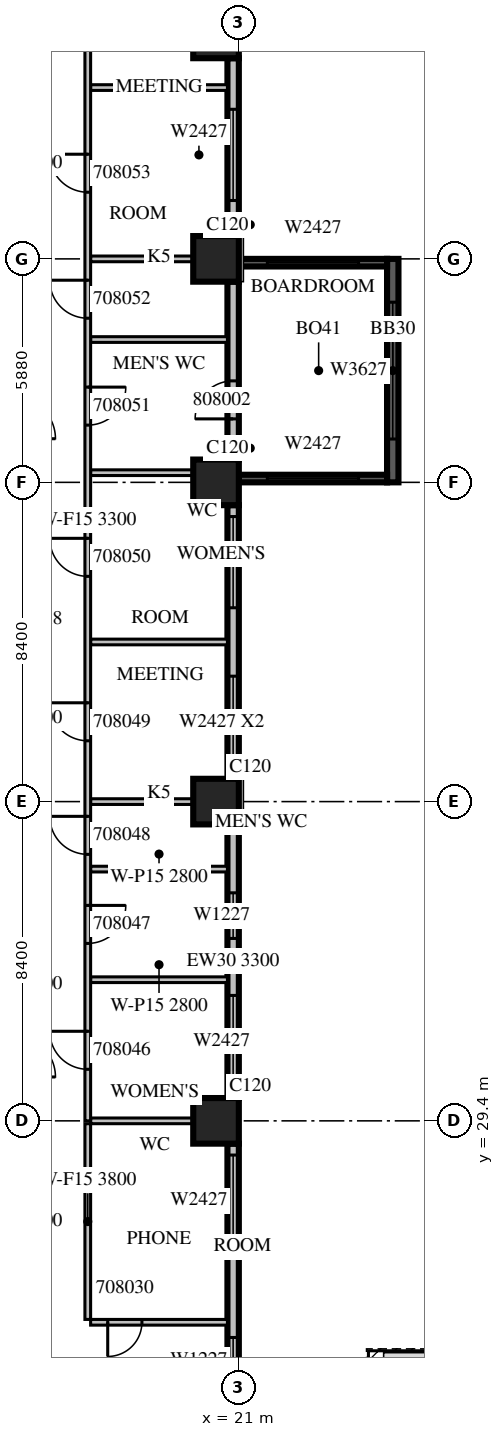
"""IFC4 building model, lengths in metres.
Left out: names, types, materials, properties, quantities, classifications, styles, units other than length and angle.
Written with IfcOpenShell. Run it as: python <this file> out.ifc"""

import sys

from ifc_helpers import new_model, si_unit, direction, frame, frame_2d, origin, origin_2d, place, context, subcontext, project, spatial, rectangle, extrude, source, transform, mapped, element, fill, save


model = new_model("IFC4")
c1 = context("Model", 3, precision=1e-05, world=origin(), true_north=direction((0.0, 1.0)))
c2 = subcontext(c1, "Body", "Model", "MODEL_VIEW")
j1 = project(units=[si_unit("LENGTHUNIT", "METRE"), si_unit("PLANEANGLEUNIT", "RADIAN")], contexts=[c1])
p1 = place(None, origin())
s1 = spatial("IfcSite", under=j1, at=p1, CompositionType="ELEMENT")
p2 = place(p1, origin())
s2 = spatial("IfcBuilding", under=s1, at=p2, CompositionType="ELEMENT")
p3 = place(p2, frame((0.0, 0.0, 44.7)))
s3 = spatial("IfcBuildingStorey", under=s2, at=p3, CompositionType="ELEMENT", Elevation=44.7)
m1 = source(origin(), c2, "Body", "SweptSolid", [
    extrude(rectangle(XDim=1.2, YDim=1.2, at=origin_2d()), origin(), (0.0, 0.0, 1.0), 4.2),
])
for number, where, z_axis, x_axis in (
    (1, (20.4, 29.4, 0.0), (0.0, 0.0, 1.0), (1.0, 0.0, 0.0)),
    (2, (20.4, 37.8, 0.0), (0.0, 0.0, 1.0), (1.0, 0.0, 0.0)),
    (3, (20.4, 46.2, 0.0), (0.0, 0.0, 1.0), (1.0, 0.0, 0.0)),
    (4, (20.4, 52.08, 0.0), (0.0, 0.0, 1.0), (1.0, 0.0, 0.0)),
    (5, (20.4, 57.96, 0.0), (0.0, 0.0, 1.0), (1.0, 0.0, 0.0)),
):
    element("IfcColumn", number, at=place(p3, frame(where, z_axis=z_axis, x_axis=x_axis)), inside=s3, PredefinedType="COLUMN", context=c2, shape_type="MappedRepresentation", body=[
        mapped(m1, transform((0.0, 0.0, 0.0), scale=1.0)),
    ])
p4 = place(p3, frame((20.85, 22.2, 0.0), z_axis=(0.0, 0.0, 1.0), x_axis=(0.0, 1.0, 0.0)))
e6 = element("IfcWall", 6, at=p4, inside=s3, PredefinedType="STANDARD", context=c2, shape_type="SweptSolid", body=[
    extrude(rectangle(XDim=6.6, YDim=0.3, at=frame_2d((3.3, 0.0))), origin(), (0.0, 0.0, 1.0), 3.8),
])
m2 = source(origin(), c2, "Body", "SweptSolid", [
    extrude(rectangle(XDim=1.2, YDim=2.7, at=frame_2d((0.6, 1.35))), frame((0.0, 0.16, 0.0), z_axis=(0.0, -1.0, 0.0), x_axis=(1.0, 0.0, 0.0)), (0.0, 0.0, 1.0), 0.32),
])
p5 = place(p4, frame((0.3, 0.0, 0.6)))
e7 = element("IfcOpeningElement", 7, at=p5, cuts=e6, PredefinedType="OPENING", context=c2, shape_type="MappedRepresentation", body=[
    mapped(m2, transform((0.0, 0.0, 0.0), scale=1.0)),
])
m3 = source(origin(), c2, "Body", "SweptSolid", [
    extrude(rectangle(XDim=2.4, YDim=2.7, at=frame_2d((1.2, 1.35))), frame((0.0, 0.16, 0.0), z_axis=(0.0, -1.0, 0.0), x_axis=(1.0, 0.0, 0.0)), (0.0, 0.0, 1.0), 0.32),
])
p6 = place(p4, frame((3.9, 0.0, 0.6)))
e8 = element("IfcOpeningElement", 8, at=p6, cuts=e6, PredefinedType="OPENING", context=c2, shape_type="MappedRepresentation", body=[
    mapped(m3, transform((0.0, 0.0, 0.0), scale=1.0)),
])
m4 = source(origin(), c2, "Body", "SweptSolid", [
    extrude(rectangle(XDim=7.2, YDim=0.3, at=frame_2d((3.6, 0.0))), origin(), (0.0, 0.0, 1.0), 3.3),
])
p7 = place(p3, frame((20.85, 30.0, 0.0), z_axis=(0.0, 0.0, 1.0), x_axis=(0.0, 1.0, 0.0)))
e9 = element("IfcWall", 9, at=p7, inside=s3, PredefinedType="STANDARD", context=c2, shape_type="MappedRepresentation", body=[
    mapped(m4, transform((0.0, 0.0, 0.0), scale=1.0)),
])
p8 = place(p7, frame((0.3, 0.0, 0.6)))
e10 = element("IfcOpeningElement", 10, at=p8, cuts=e9, PredefinedType="OPENING", context=c2, shape_type="MappedRepresentation", body=[
    mapped(m3, transform((0.0, 0.0, 0.0), scale=1.0)),
])
p9 = place(p7, frame((4.199, 0.0, 0.6)))
e11 = element("IfcOpeningElement", 11, at=p9, cuts=e9, PredefinedType="OPENING", context=c2, shape_type="MappedRepresentation", body=[
    mapped(m2, transform((0.0, 0.0, 0.0), scale=1.0)),
])
m5 = source(origin(), c2, "Body", "SweptSolid", [
    extrude(rectangle(XDim=7.2, YDim=0.3, at=frame_2d((3.6, 0.0))), origin(), (0.0, 0.0, 1.0), 3.8),
])
p10 = place(p3, frame((20.85, 38.4, 0.0), z_axis=(0.0, 0.0, 1.0), x_axis=(0.0, 1.0, 0.0)))
e12 = element("IfcWall", 12, at=p10, inside=s3, PredefinedType="STANDARD", context=c2, shape_type="MappedRepresentation", body=[
    mapped(m5, transform((0.0, 0.0, 0.0), scale=1.0)),
])
p11 = place(p10, frame((0.3, 0.0, 0.6)))
e13 = element("IfcOpeningElement", 13, at=p11, cuts=e12, PredefinedType="OPENING", context=c2, shape_type="MappedRepresentation", body=[
    mapped(m3, transform((0.0, 0.0, 0.0), scale=1.0)),
])
p12 = place(p10, frame((4.5, 0.0, 0.6)))
e14 = element("IfcOpeningElement", 14, at=p12, cuts=e12, PredefinedType="OPENING", context=c2, shape_type="MappedRepresentation", body=[
    mapped(m3, transform((0.0, 0.0, 0.0), scale=1.0)),
])
m6 = source(origin(), c2, "Body", "SweptSolid", [
    extrude(rectangle(XDim=4.68, YDim=0.3, at=frame_2d((2.34, 0.0))), origin(), (0.0, 0.0, 1.0), 3.8),
])
p13 = place(p3, frame((20.85, 46.8, 0.0), z_axis=(0.0, 0.0, 1.0), x_axis=(0.0, 1.0, 0.0)))
e15 = element("IfcWall", 15, at=p13, inside=s3, PredefinedType="STANDARD", context=c2, shape_type="MappedRepresentation", body=[
    mapped(m6, transform((0.0, 0.0, 0.0), scale=1.0)),
])
m7 = source(origin(), c2, "Body", "SweptSolid", [
    extrude(rectangle(XDim=1.0, YDim=2.1, at=frame_2d((0.5, 1.05))), frame((0.0, 0.16, 0.0), z_axis=(0.0, -1.0, 0.0), x_axis=(1.0, 0.0, 0.0)), (0.0, 0.0, 1.0), 0.32),
])
p14 = place(p13, frame((1.07, 0.0, 0.0)))
e16 = element("IfcOpeningElement", 16, at=p14, cuts=e15, PredefinedType="OPENING", context=c2, shape_type="MappedRepresentation", body=[
    mapped(m7, transform((0.0, 0.0, 0.0), scale=1.0)),
])
p15 = place(p3, frame((20.85, 52.68, 0.0), z_axis=(0.0, 0.0, 1.0), x_axis=(0.0, 1.0, 0.0)))
e17 = element("IfcWall", 17, at=p15, inside=s3, PredefinedType="STANDARD", context=c2, shape_type="MappedRepresentation", body=[
    mapped(m6, transform((0.0, 0.0, 0.0), scale=1.0)),
])
p16 = place(p15, frame((0.936, 0.0, 0.6)))
e18 = element("IfcOpeningElement", 18, at=p16, cuts=e17, PredefinedType="OPENING", context=c2, shape_type="MappedRepresentation", body=[
    mapped(m3, transform((0.0, 0.0, 0.0), scale=1.0)),
])
m8 = source(origin(), c2, "Body", "SweptSolid", [
    extrude(rectangle(XDim=5.88, YDim=0.3, at=frame_2d((2.94, 0.0))), origin(), (0.0, 0.0, 1.0), 3.79),
])
p17 = place(p3, frame((25.05, 46.2, 0.0), z_axis=(0.0, 0.0, 1.0), x_axis=(0.0, 1.0, 0.0)))
e19 = element("IfcWall", 19, at=p17, inside=s3, PredefinedType="SOLIDWALL", context=c2, shape_type="MappedRepresentation", body=[
    mapped(m8, transform((0.0, 0.0, 0.0), scale=1.0)),
])
m9 = source(origin(), c2, "Body", "SweptSolid", [
    extrude(rectangle(XDim=3.6, YDim=2.7, at=frame_2d((1.8, 1.35))), frame((0.0, 0.16, 0.0), z_axis=(0.0, -1.0, 0.0), x_axis=(1.0, 0.0, 0.0)), (0.0, 0.0, 1.0), 0.32),
])
p18 = place(p17, frame((1.14, 0.0, 0.6)))
e20 = element("IfcOpeningElement", 20, at=p18, cuts=e19, PredefinedType="OPENING", context=c2, shape_type="MappedRepresentation", body=[
    mapped(m9, transform((0.0, 0.0, 0.0), scale=1.0)),
])
m10 = source(origin(), c2, "Body", "SweptSolid", [
    extrude(rectangle(XDim=3.9, YDim=0.2, at=frame_2d((1.95, 0.0))), origin(), (0.0, 0.0, 1.0), 3.79),
])
p19 = place(p3, frame((21.0, 46.3, 0.0), z_axis=(0.0, 0.0, 1.0), x_axis=(1.0, 0.0, 0.0)))
e21 = element("IfcWall", 21, at=p19, inside=s3, PredefinedType="SOLIDWALL", context=c2, shape_type="MappedRepresentation", body=[
    mapped(m10, transform((0.0, 0.0, 0.0), scale=1.0)),
])
m11 = source(origin(), c2, "Body", "SweptSolid", [
    extrude(rectangle(XDim=2.4, YDim=2.7, at=frame_2d((1.2, 1.35))), frame((0.0, 0.11, 0.0), z_axis=(0.0, -1.0, 0.0), x_axis=(1.0, 0.0, 0.0)), (0.0, 0.0, 1.0), 0.22),
])
p20 = place(p19, frame((0.75, 0.0, 0.6)))
e22 = element("IfcOpeningElement", 22, at=p20, cuts=e21, PredefinedType="OPENING", context=c2, shape_type="MappedRepresentation", body=[
    mapped(m11, transform((0.0, 0.0, 0.0), scale=1.0)),
])
p21 = place(p3, frame((21.0, 51.98, 0.0), z_axis=(0.0, 0.0, 1.0), x_axis=(1.0, 0.0, 0.0)))
e23 = element("IfcWall", 23, at=p21, inside=s3, PredefinedType="SOLIDWALL", context=c2, shape_type="MappedRepresentation", body=[
    mapped(m10, transform((0.0, 0.0, 0.0), scale=1.0)),
])
p22 = place(p21, frame((0.75, 0.0, 0.6)))
e24 = element("IfcOpeningElement", 24, at=p22, cuts=e23, PredefinedType="OPENING", context=c2, shape_type="MappedRepresentation", body=[
    mapped(m11, transform((0.0, 0.0, 0.0), scale=1.0)),
])
m12 = source(origin(), c2, "Body", "SweptSolid", [
    extrude(rectangle(XDim=3.6, YDim=0.15, at=frame_2d((1.8, 0.0))), origin(), (0.0, 0.0, 1.0), 3.8),
])
p23 = place(p3, frame((17.1, 24.1, 0.0), z_axis=(0.0, 0.0, 1.0), x_axis=(1.0, 0.0, 0.0)))
e25 = element("IfcWall", 25, at=p23, inside=s3, PredefinedType="PARTITIONING", context=c2, shape_type="MappedRepresentation", body=[
    mapped(m12, transform((0.0, 0.0, 0.0), scale=1.0)),
])
m13 = source(origin(), c2, "Body", "SweptSolid", [
    extrude(rectangle(XDim=0.9, YDim=2.1, at=frame_2d((0.45, 1.05))), frame((0.0, 0.085, 0.0), z_axis=(0.0, -1.0, 0.0), x_axis=(1.0, 0.0, 0.0)), (0.0, 0.0, 1.0), 0.17),
])
p24 = place(p23, frame((0.45, 0.0, 0.0)))
e26 = element("IfcOpeningElement", 26, at=p24, cuts=e25, PredefinedType="OPENING", context=c2, shape_type="MappedRepresentation", body=[
    mapped(m13, transform((0.0, 0.0, 0.0), scale=1.0)),
])
m14 = source(origin(), c2, "Body", "SweptSolid", [
    extrude(rectangle(XDim=5.15, YDim=0.15, at=frame_2d((2.575, 0.0))), origin(), (0.0, 0.0, 1.0), 3.8),
])
p25 = place(p3, frame((17.025, 29.325, 0.0), z_axis=(0.0, 0.0, 1.0), x_axis=(0.0, -1.0, 0.0)))
e27 = element("IfcWall", 27, at=p25, inside=s3, PredefinedType="PARTITIONING", context=c2, shape_type="MappedRepresentation", body=[
    mapped(m14, transform((0.0, 0.0, 0.0), scale=1.0)),
])
m15 = source(origin(), c2, "Body", "SweptSolid", [
    extrude(rectangle(XDim=2.701, YDim=0.15, at=frame_2d((1.351, 0.0))), origin(), (0.0, 0.0, 1.0), 3.8),
])
p26 = place(p3, frame((19.801, 29.4, 0.0), z_axis=(0.0, 0.0, 1.0), x_axis=(-1.0, 0.0, 0.0)))
e28 = element("IfcWall", 28, at=p26, inside=s3, PredefinedType="PARTITIONING", context=c2, shape_type="MappedRepresentation", body=[
    mapped(m15, transform((0.0, 0.0, 0.0), scale=1.0)),
])
m16 = source(origin(), c2, "Body", "SweptSolid", [
    extrude(rectangle(XDim=3.6, YDim=0.15, at=frame_2d((1.8, 0.0))), origin(), (0.0, 0.0, 1.0), 2.8),
])
for number, where, z_axis, x_axis in (
    (29, (17.1, 33.113, 0.0), (0.0, 0.0, 1.0), (1.0, 0.0, 0.0)),
    (30, (17.1, 36.024, 0.0), (0.0, 0.0, 1.0), (1.0, 0.0, 0.0)),
):
    element("IfcWall", number, at=place(p3, frame(where, z_axis=z_axis, x_axis=x_axis)), inside=s3, PredefinedType="PARTITIONING", context=c2, shape_type="MappedRepresentation", body=[
        mapped(m16, transform((0.0, 0.0, 0.0), scale=1.0)),
    ])
p27 = place(p3, frame((17.1, 46.454, 0.0), z_axis=(0.0, 0.0, 1.0), x_axis=(1.0, 0.0, 0.0)))
e31 = element("IfcWall", 31, at=p27, inside=s3, PredefinedType="PARTITIONING", context=c2, shape_type="MappedRepresentation", body=[
    mapped(m15, transform((0.0, 0.0, 0.0), scale=1.0)),
])
for number, where, z_axis, x_axis in (
    (32, (17.1, 49.958, 0.0), (0.0, 0.0, 1.0), (1.0, 0.0, 0.0)),
    (33, (17.1, 56.587, 0.0), (0.0, 0.0, 1.0), (1.0, 0.0, 0.0)),
):
    element("IfcWall", number, at=place(p3, frame(where, z_axis=z_axis, x_axis=x_axis)), inside=s3, PredefinedType="PARTITIONING", context=c2, shape_type="MappedRepresentation", body=[
        mapped(m12, transform((0.0, 0.0, 0.0), scale=1.0)),
    ])
p28 = place(p3, frame((19.801, 37.8, 0.0), z_axis=(0.0, 0.0, 1.0), x_axis=(-1.0, 0.0, 0.0)))
e34 = element("IfcWall", 34, at=p28, inside=s3, PredefinedType="PARTITIONING", context=c2, shape_type="MappedRepresentation", body=[
    mapped(m15, transform((0.0, 0.0, 0.0), scale=1.0)),
])
p29 = place(p3, frame((20.7, 42.0, 0.0), z_axis=(0.0, 0.0, 1.0), x_axis=(-1.0, 0.0, 0.0)))
e35 = element("IfcWall", 35, at=p29, inside=s3, PredefinedType="PARTITIONING", context=c2, shape_type="MappedRepresentation", body=[
    mapped(m12, transform((0.0, 0.0, 0.0), scale=1.0)),
])
p30 = place(p3, frame((19.801, 52.08, 0.0), z_axis=(0.0, 0.0, 1.0), x_axis=(-1.0, 0.0, 0.0)))
e36 = element("IfcWall", 36, at=p30, inside=s3, PredefinedType="PARTITIONING", context=c2, shape_type="MappedRepresentation", body=[
    mapped(m15, transform((0.0, 0.0, 0.0), scale=1.0)),
])
m17 = source(origin(), c2, "Body", "SweptSolid", [
    extrude(rectangle(XDim=31.62, YDim=0.15, at=frame_2d((15.81, 0.0))), origin(), (0.0, 0.0, 1.0), 3.3),
])
p31 = place(p3, frame((17.025, 61.02, 0.0), z_axis=(0.0, 0.0, 1.0), x_axis=(0.0, -1.0, 0.0)))
e37 = element("IfcWall", 37, at=p31, inside=s3, PredefinedType="PARTITIONING", context=c2, shape_type="MappedRepresentation", body=[
    mapped(m17, transform((0.0, 0.0, 0.0), scale=1.0)),
])
m18 = source(origin(), c2, "Body", "SweptSolid", [
    extrude(rectangle(XDim=1.0, YDim=2.1, at=frame_2d((0.5, 1.05))), frame((0.0, 0.085, 0.0), z_axis=(0.0, -1.0, 0.0), x_axis=(1.0, 0.0, 0.0)), (0.0, 0.0, 1.0), 0.17),
])
p32 = place(p31, frame((29.263, 0.0, 0.0)))
e38 = element("IfcOpeningElement", 38, at=p32, cuts=e37, PredefinedType="OPENING", context=c2, shape_type="MappedRepresentation", body=[
    mapped(m18, transform((0.0, 0.0, 0.0), scale=1.0)),
])
p33 = place(p31, frame((25.951, 0.0, 0.0)))
e39 = element("IfcOpeningElement", 39, at=p33, cuts=e37, PredefinedType="OPENING", context=c2, shape_type="MappedRepresentation", body=[
    mapped(m18, transform((0.0, 0.0, 0.0), scale=1.0)),
])
p34 = place(p31, frame((23.608, 0.0, 0.0)))
e40 = element("IfcOpeningElement", 40, at=p34, cuts=e37, PredefinedType="OPENING", context=c2, shape_type="MappedRepresentation", body=[
    mapped(m18, transform((0.0, 0.0, 0.0), scale=1.0)),
])
p35 = place(p31, frame((20.62, 0.0, 0.0)))
e41 = element("IfcOpeningElement", 41, at=p35, cuts=e37, PredefinedType="OPENING", context=c2, shape_type="MappedRepresentation", body=[
    mapped(m18, transform((0.0, 0.0, 0.0), scale=1.0)),
])
p36 = place(p31, frame((16.293, 0.0, 0.0)))
e42 = element("IfcOpeningElement", 42, at=p36, cuts=e37, PredefinedType="OPENING", context=c2, shape_type="MappedRepresentation", body=[
    mapped(m18, transform((0.0, 0.0, 0.0), scale=1.0)),
])
p37 = place(p31, frame((12.314, 0.0, 0.0)))
e43 = element("IfcOpeningElement", 43, at=p37, cuts=e37, PredefinedType="OPENING", context=c2, shape_type="MappedRepresentation", body=[
    mapped(m18, transform((0.0, 0.0, 0.0), scale=1.0)),
])
p38 = place(p31, frame((9.501, 0.0, 0.0)))
e44 = element("IfcOpeningElement", 44, at=p38, cuts=e37, PredefinedType="OPENING", context=c2, shape_type="MappedRepresentation", body=[
    mapped(m18, transform((0.0, 0.0, 0.0), scale=1.0)),
])
p39 = place(p31, frame((6.186, 0.0, 0.0)))
e45 = element("IfcOpeningElement", 45, at=p39, cuts=e37, PredefinedType="OPENING", context=c2, shape_type="MappedRepresentation", body=[
    mapped(m18, transform((0.0, 0.0, 0.0), scale=1.0)),
])
p40 = place(p31, frame((1.679, 0.0, 0.0)))
e46 = element("IfcOpeningElement", 46, at=p40, cuts=e37, PredefinedType="OPENING", context=c2, shape_type="MappedRepresentation", body=[
    mapped(m18, transform((0.0, 0.0, 0.0), scale=1.0)),
])
m19 = source(origin(), c2, "Body", "SweptSolid", [
    extrude(rectangle(XDim=1.2, YDim=2.7, at=frame_2d((0.6, 1.35))), frame((0.0, 0.03, 0.0), z_axis=(0.0, -1.0, 0.0), x_axis=(1.0, 0.0, 0.0)), (0.0, 0.0, 1.0), 0.06),
])
p41 = place(p5, origin())
e47 = element("IfcWindow", 47, at=p41, inside=s3, PartitioningType="SINGLE_PANEL", PredefinedType="WINDOW", context=c2, shape_type="MappedRepresentation", body=[
    mapped(m19, transform((0.0, 0.0, 0.0), scale=1.0)),
])
fill(e7, e47)
m20 = source(origin(), c2, "Body", "SweptSolid", [
    extrude(rectangle(XDim=2.4, YDim=2.7, at=frame_2d((1.2, 1.35))), frame((0.0, 0.03, 0.0), z_axis=(0.0, -1.0, 0.0), x_axis=(1.0, 0.0, 0.0)), (0.0, 0.0, 1.0), 0.06),
])
p42 = place(p6, origin())
e48 = element("IfcWindow", 48, at=p42, inside=s3, PartitioningType="SINGLE_PANEL", PredefinedType="WINDOW", context=c2, shape_type="MappedRepresentation", body=[
    mapped(m20, transform((0.0, 0.0, 0.0), scale=1.0)),
])
fill(e8, e48)
p43 = place(p8, origin())
e49 = element("IfcWindow", 49, at=p43, inside=s3, PartitioningType="SINGLE_PANEL", PredefinedType="WINDOW", context=c2, shape_type="MappedRepresentation", body=[
    mapped(m20, transform((0.0, 0.0, 0.0), scale=1.0)),
])
fill(e10, e49)
p44 = place(p9, origin())
e50 = element("IfcWindow", 50, at=p44, inside=s3, PartitioningType="SINGLE_PANEL", PredefinedType="WINDOW", context=c2, shape_type="MappedRepresentation", body=[
    mapped(m19, transform((0.0, 0.0, 0.0), scale=1.0)),
])
fill(e11, e50)
p45 = place(p11, origin())
e51 = element("IfcWindow", 51, at=p45, inside=s3, PartitioningType="SINGLE_PANEL", PredefinedType="WINDOW", context=c2, shape_type="MappedRepresentation", body=[
    mapped(m20, transform((0.0, 0.0, 0.0), scale=1.0)),
])
fill(e13, e51)
p46 = place(p12, origin())
e52 = element("IfcWindow", 52, at=p46, inside=s3, PartitioningType="SINGLE_PANEL", PredefinedType="WINDOW", context=c2, shape_type="MappedRepresentation", body=[
    mapped(m20, transform((0.0, 0.0, 0.0), scale=1.0)),
])
fill(e14, e52)
p47 = place(p16, origin())
e53 = element("IfcWindow", 53, at=p47, inside=s3, PartitioningType="SINGLE_PANEL", PredefinedType="WINDOW", context=c2, shape_type="MappedRepresentation", body=[
    mapped(m20, transform((0.0, 0.0, 0.0), scale=1.0)),
])
fill(e18, e53)
m21 = source(origin(), c2, "Body", "SweptSolid", [
    extrude(rectangle(XDim=3.6, YDim=2.7, at=frame_2d((1.8, 1.35))), frame((0.0, 0.03, 0.0), z_axis=(0.0, -1.0, 0.0), x_axis=(1.0, 0.0, 0.0)), (0.0, 0.0, 1.0), 0.06),
])
p48 = place(p18, origin())
e54 = element("IfcWindow", 54, at=p48, inside=s3, PartitioningType="SINGLE_PANEL", PredefinedType="WINDOW", context=c2, shape_type="MappedRepresentation", body=[
    mapped(m21, transform((0.0, 0.0, 0.0), scale=1.0)),
])
fill(e20, e54)
p49 = place(p20, origin())
e55 = element("IfcWindow", 55, at=p49, inside=s3, PartitioningType="SINGLE_PANEL", PredefinedType="WINDOW", context=c2, shape_type="MappedRepresentation", body=[
    mapped(m20, transform((0.0, 0.0, 0.0), scale=1.0)),
])
fill(e22, e55)
p50 = place(p22, origin())
e56 = element("IfcWindow", 56, at=p50, inside=s3, PartitioningType="SINGLE_PANEL", PredefinedType="WINDOW", context=c2, shape_type="MappedRepresentation", body=[
    mapped(m20, transform((0.0, 0.0, 0.0), scale=1.0)),
])
fill(e24, e56)
m22 = source(origin(), c2, "Body", "SweptSolid", [
    extrude(rectangle(XDim=0.9, YDim=2.1, at=frame_2d((0.45, 1.05))), frame((0.0, 0.025, 0.0), z_axis=(0.0, -1.0, 0.0), x_axis=(1.0, 0.0, 0.0)), (0.0, 0.0, 1.0), 0.05),
])
p51 = place(p24, origin())
e57 = element("IfcDoor", 57, at=p51, inside=s3, OperationType="SINGLE_SWING_RIGHT", PredefinedType="DOOR", context=c2, shape_type="MappedRepresentation", body=[
    mapped(m22, transform((0.0, 0.0, 0.0), scale=1.0)),
])
fill(e26, e57)
m23 = source(origin(), c2, "Body", "SweptSolid", [
    extrude(rectangle(XDim=1.0, YDim=2.1, at=frame_2d((0.5, 1.05))), frame((0.0, 0.025, 0.0), z_axis=(0.0, -1.0, 0.0), x_axis=(1.0, 0.0, 0.0)), (0.0, 0.0, 1.0), 0.05),
])
p52 = place(p32, origin())
e58 = element("IfcDoor", 58, at=p52, inside=s3, OperationType="SINGLE_SWING_RIGHT", PredefinedType="DOOR", context=c2, shape_type="MappedRepresentation", body=[
    mapped(m23, transform((0.0, 0.0, 0.0), scale=1.0)),
])
fill(e38, e58)
p53 = place(p33, origin())
e59 = element("IfcDoor", 59, at=p53, inside=s3, OperationType="SINGLE_SWING_LEFT", PredefinedType="DOOR", context=c2, shape_type="MappedRepresentation", body=[
    mapped(m23, transform((0.0, 0.0, 0.0), scale=1.0)),
])
fill(e39, e59)
p54 = place(p34, origin())
e60 = element("IfcDoor", 60, at=p54, inside=s3, OperationType="SINGLE_SWING_RIGHT", PredefinedType="DOOR", context=c2, shape_type="MappedRepresentation", body=[
    mapped(m23, transform((0.0, 0.0, 0.0), scale=1.0)),
])
fill(e40, e60)
p55 = place(p35, origin())
e61 = element("IfcDoor", 61, at=p55, inside=s3, OperationType="SINGLE_SWING_RIGHT", PredefinedType="DOOR", context=c2, shape_type="MappedRepresentation", body=[
    mapped(m23, transform((0.0, 0.0, 0.0), scale=1.0)),
])
fill(e41, e61)
p56 = place(p36, origin())
e62 = element("IfcDoor", 62, at=p56, inside=s3, OperationType="SINGLE_SWING_RIGHT", PredefinedType="DOOR", context=c2, shape_type="MappedRepresentation", body=[
    mapped(m23, transform((0.0, 0.0, 0.0), scale=1.0)),
])
fill(e42, e62)
p57 = place(p37, origin())
e63 = element("IfcDoor", 63, at=p57, inside=s3, OperationType="SINGLE_SWING_LEFT", PredefinedType="DOOR", context=c2, shape_type="MappedRepresentation", body=[
    mapped(m23, transform((0.0, 0.0, 0.0), scale=1.0)),
])
fill(e43, e63)
p58 = place(p38, origin())
e64 = element("IfcDoor", 64, at=p58, inside=s3, OperationType="SINGLE_SWING_RIGHT", PredefinedType="DOOR", context=c2, shape_type="MappedRepresentation", body=[
    mapped(m23, transform((0.0, 0.0, 0.0), scale=1.0)),
])
fill(e44, e64)
p59 = place(p39, origin())
e65 = element("IfcDoor", 65, at=p59, inside=s3, OperationType="SINGLE_SWING_RIGHT", PredefinedType="DOOR", context=c2, shape_type="MappedRepresentation", body=[
    mapped(m23, transform((0.0, 0.0, 0.0), scale=1.0)),
])
fill(e45, e65)
p60 = place(p14, origin())
e66 = element("IfcDoor", 66, at=p60, inside=s3, OperationType="SINGLE_SWING_LEFT", PredefinedType="DOOR", context=c2, shape_type="MappedRepresentation", body=[
    mapped(m23, transform((0.0, 0.0, 0.0), scale=1.0)),
])
fill(e16, e66)
save(model, sys.argv[1])
